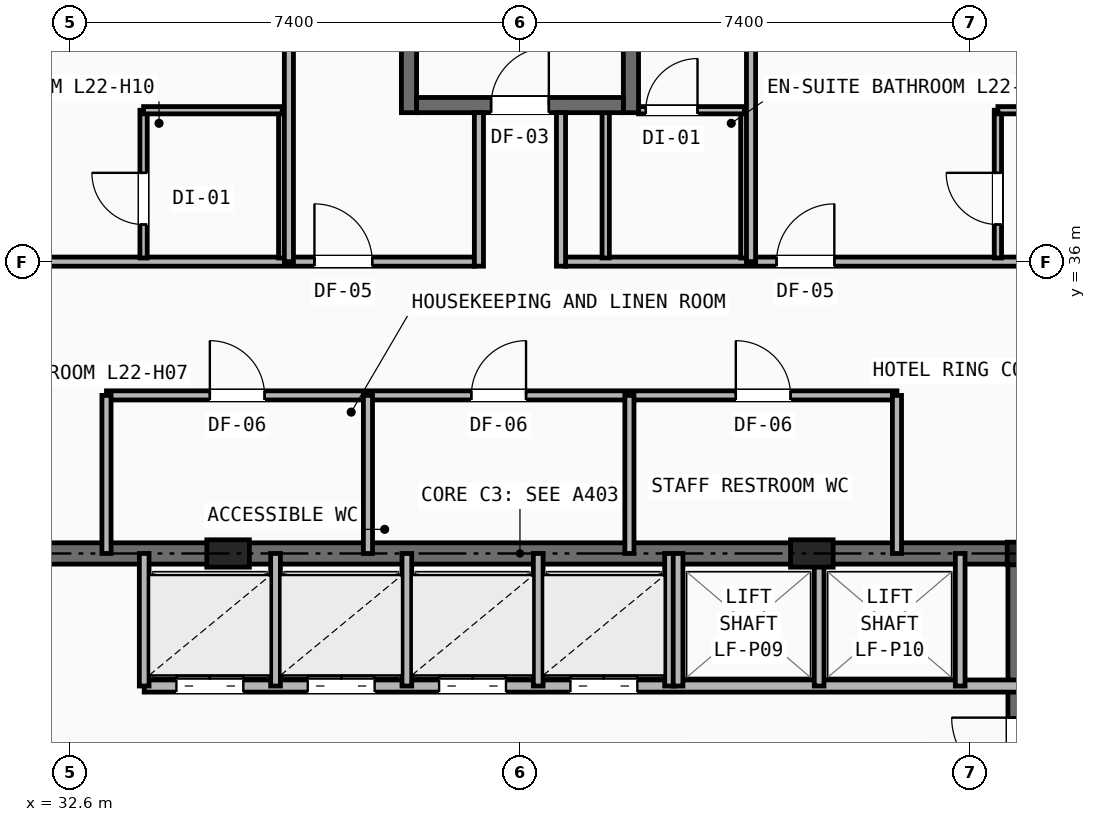
"""IFC4 building model, lengths in metres.
Left out: names, types, materials, properties, quantities, classifications, styles, units other than length and angle.
Written with IfcOpenShell. Run it as: python <this file> out.ifc"""

import sys

from ifc_helpers import new_model, si_unit, direction, frame, frame_2d, origin, origin_2d, place, context, subcontext, project, spatial, rectangle, i_section, extrude, element, fill, save


model = new_model("IFC4")
c1 = context("Model", 3, precision=1e-05, world=origin(), true_north=direction((0.0, 1.0)))
c2 = subcontext(c1, "Body", "Model", "MODEL_VIEW")
j1 = project(units=[si_unit("LENGTHUNIT", "METRE"), si_unit("PLANEANGLEUNIT", "RADIAN")], contexts=[c1])
p1 = place(None, origin())
s1 = spatial("IfcSite", under=j1, at=p1, CompositionType="ELEMENT")
p2 = place(p1, origin())
s2 = spatial("IfcBuilding", under=s1, at=p2, CompositionType="ELEMENT")
p3 = place(p2, frame((0.0, 0.0, 79.8)))
s3 = spatial("IfcBuildingStorey", under=s2, at=p3, CompositionType="ELEMENT", Elevation=79.8)
p4 = place(p3, frame((48.2, 31.2, 0.0), z_axis=(0.0, 0.0, 1.0), x_axis=(1.0, 0.0, 0.0)))
e1 = element("IfcColumn", 1, at=p4, inside=s3, PredefinedType="COLUMN", context=c2, shape_type="SweptSolid", body=[
    extrude(i_section(OverallWidth=0.374, OverallDepth=0.372, WebThickness=0.016, FlangeThickness=0.026, at=origin_2d()), origin(), (0.0, 0.0, 1.0), 3.2),
])
for number, where, z_axis, x_axis in (
    (2, (35.2, 31.2, 0.0), (0.0, 0.0, 1.0), (1.0, 0.0, 0.0)),
    (3, (44.8, 31.2, 0.0), (0.0, 0.0, 1.0), (1.0, 0.0, 0.0)),
):
    element("IfcColumn", number, at=place(p3, frame(where, z_axis=z_axis, x_axis=x_axis)), inside=s3, PredefinedType="PILASTER", context=c2, shape_type="SweptSolid", body=[
        extrude(rectangle(XDim=0.7, YDim=0.45, at=origin_2d()), origin(), (0.0, 0.0, 1.0), 3.2),
    ])
p5 = place(p3, frame((31.8, 31.2, 0.0), z_axis=(0.0, 0.0, 1.0), x_axis=(1.0, 0.0, 0.0)))
e4 = element("IfcWall", 4, at=p5, inside=s3, PredefinedType="SHEAR", context=c2, shape_type="SweptSolid", body=[
    extrude(rectangle(XDim=16.4, YDim=0.35, at=frame_2d((8.2, 0.0))), origin(), (0.0, 0.0, 1.0), 2.97),
])
p6 = place(p3, frame((48.2, 16.4, 0.0), z_axis=(0.0, 0.0, 1.0), x_axis=(0.0, 1.0, 0.0)))
e5 = element("IfcWall", 5, at=p6, inside=s3, PredefinedType="SHEAR", context=c2, shape_type="SweptSolid", body=[
    extrude(rectangle(XDim=14.8, YDim=0.35, at=frame_2d((7.4, 0.0))), origin(), (0.0, 0.0, 1.0), 2.97),
])
p7 = place(p6, frame((11.0, 0.0, 0.0)))
e6 = element("IfcOpeningElement", 6, at=p7, cuts=e5, PredefinedType="OPENING", context=c2, shape_type="SweptSolid", body=[
    extrude(rectangle(XDim=1.1, YDim=2.15, at=frame_2d((0.55, 1.075))), frame((0.0, 0.185, 0.0), z_axis=(0.0, -1.0, 0.0), x_axis=(1.0, 0.0, 0.0)), (0.0, 0.0, 1.0), 0.37),
])
p8 = place(p3, frame((33.82, 29.02, 0.0), z_axis=(0.0, 0.0, 1.0), x_axis=(1.0, 0.0, 0.0)))
e7 = element("IfcWall", 7, at=p8, inside=s3, PredefinedType="SOLIDWALL", context=c2, shape_type="SweptSolid", body=[
    extrude(rectangle(XDim=14.38, YDim=0.2, at=frame_2d((7.19, 0.0))), origin(), (0.0, 0.0, 1.0), 2.421),
])
p9 = place(p8, frame((0.53, 0.0, 0.0)))
e8 = element("IfcOpeningElement", 8, at=p9, cuts=e7, PredefinedType="OPENING", context=c2, shape_type="SweptSolid", body=[
    extrude(rectangle(XDim=1.1, YDim=2.15, at=frame_2d((0.55, 1.075))), frame((0.0, 0.11, 0.0), z_axis=(0.0, -1.0, 0.0), x_axis=(1.0, 0.0, 0.0)), (0.0, 0.0, 1.0), 0.22),
])
p10 = place(p8, frame((2.69, 0.0, 0.0)))
e9 = element("IfcOpeningElement", 9, at=p10, cuts=e7, PredefinedType="OPENING", context=c2, shape_type="SweptSolid", body=[
    extrude(rectangle(XDim=1.1, YDim=2.15, at=frame_2d((0.55, 1.075))), frame((0.0, 0.11, 0.0), z_axis=(0.0, -1.0, 0.0), x_axis=(1.0, 0.0, 0.0)), (0.0, 0.0, 1.0), 0.22),
])
p11 = place(p8, frame((4.85, 0.0, 0.0)))
e10 = element("IfcOpeningElement", 10, at=p11, cuts=e7, PredefinedType="OPENING", context=c2, shape_type="SweptSolid", body=[
    extrude(rectangle(XDim=1.1, YDim=2.15, at=frame_2d((0.55, 1.075))), frame((0.0, 0.11, 0.0), z_axis=(0.0, -1.0, 0.0), x_axis=(1.0, 0.0, 0.0)), (0.0, 0.0, 1.0), 0.22),
])
p12 = place(p8, frame((7.01, 0.0, 0.0)))
e11 = element("IfcOpeningElement", 11, at=p12, cuts=e7, PredefinedType="OPENING", context=c2, shape_type="SweptSolid", body=[
    extrude(rectangle(XDim=1.1, YDim=2.15, at=frame_2d((0.55, 1.075))), frame((0.0, 0.11, 0.0), z_axis=(0.0, -1.0, 0.0), x_axis=(1.0, 0.0, 0.0)), (0.0, 0.0, 1.0), 0.22),
])
for number, where, z_axis, x_axis in (
    (12, (33.82, 29.02, 0.0), (0.0, 0.0, 1.0), (0.0, 1.0, 0.0)),
    (13, (35.98, 29.02, 0.0), (0.0, 0.0, 1.0), (0.0, 1.0, 0.0)),
    (14, (38.14, 29.02, 0.0), (0.0, 0.0, 1.0), (0.0, 1.0, 0.0)),
    (15, (40.3, 29.02, 0.0), (0.0, 0.0, 1.0), (0.0, 1.0, 0.0)),
    (16, (42.46, 29.02, 0.0), (0.0, 0.0, 1.0), (0.0, 1.0, 0.0)),
    (17, (42.6, 29.02, 0.0), (0.0, 0.0, 1.0), (0.0, 1.0, 0.0)),
    (18, (44.92, 29.02, 0.0), (0.0, 0.0, 1.0), (0.0, 1.0, 0.0)),
    (19, (47.24, 29.02, 0.0), (0.0, 0.0, 1.0), (0.0, 1.0, 0.0)),
):
    element("IfcWall", number, at=place(p3, frame(where, z_axis=z_axis, x_axis=x_axis)), inside=s3, PredefinedType="SOLIDWALL", context=c2, shape_type="SweptSolid", body=[
        extrude(rectangle(XDim=2.18, YDim=0.16, at=frame_2d((1.09, 0.0))), origin(), (0.0, 0.0, 1.0), 2.421),
    ])
p13 = place(p3, frame((33.2, 33.8, 0.0), z_axis=(0.0, 0.0, 1.0), x_axis=(1.0, 0.0, 0.0)))
e20 = element("IfcWall", 20, at=p13, inside=s3, PredefinedType="PARTITIONING", context=c2, shape_type="SweptSolid", body=[
    extrude(rectangle(XDim=13.0, YDim=0.15, at=frame_2d((6.5, 0.0))), origin(), (0.0, 0.0, 1.0), 2.97),
])
p14 = place(p13, frame((1.7, 0.0, 0.0)))
e21 = element("IfcOpeningElement", 21, at=p14, cuts=e20, PredefinedType="OPENING", context=c2, shape_type="SweptSolid", body=[
    extrude(rectangle(XDim=0.9, YDim=2.1, at=frame_2d((0.45, 1.05))), frame((0.0, 0.085, 0.0), z_axis=(0.0, -1.0, 0.0), x_axis=(1.0, 0.0, 0.0)), (0.0, 0.0, 1.0), 0.17),
])
p15 = place(p13, frame((6.0, 0.0, 0.0)))
e22 = element("IfcOpeningElement", 22, at=p15, cuts=e20, PredefinedType="OPENING", context=c2, shape_type="SweptSolid", body=[
    extrude(rectangle(XDim=0.9, YDim=2.1, at=frame_2d((0.45, 1.05))), frame((0.0, 0.085, 0.0), z_axis=(0.0, -1.0, 0.0), x_axis=(1.0, 0.0, 0.0)), (0.0, 0.0, 1.0), 0.17),
])
p16 = place(p13, frame((10.35, 0.0, 0.0)))
e23 = element("IfcOpeningElement", 23, at=p16, cuts=e20, PredefinedType="OPENING", context=c2, shape_type="SweptSolid", body=[
    extrude(rectangle(XDim=0.9, YDim=2.1, at=frame_2d((0.45, 1.05))), frame((0.0, 0.085, 0.0), z_axis=(0.0, -1.0, 0.0), x_axis=(1.0, 0.0, 0.0)), (0.0, 0.0, 1.0), 0.17),
])
for number, where, z_axis, x_axis in (
    (24, (33.2, 31.2, 0.0), (0.0, 0.0, 1.0), (0.0, 1.0, 0.0)),
    (25, (46.2, 31.2, 0.0), (0.0, 0.0, 1.0), (0.0, 1.0, 0.0)),
    (26, (37.5, 31.2, 0.0), (0.0, 0.0, 1.0), (0.0, 1.0, 0.0)),
    (27, (41.8, 31.2, 0.0), (0.0, 0.0, 1.0), (0.0, 1.0, 0.0)),
):
    element("IfcWall", number, at=place(p3, frame(where, z_axis=z_axis, x_axis=x_axis)), inside=s3, PredefinedType="PARTITIONING", context=c2, shape_type="SweptSolid", body=[
        extrude(rectangle(XDim=2.6, YDim=0.15, at=frame_2d((1.3, 0.0))), origin(), (0.0, 0.0, 1.0), 2.421),
    ])
p17 = place(p3, frame((29.6, 36.0, 0.0), z_axis=(0.0, 0.0, 1.0), x_axis=(1.0, 0.0, 0.0)))
e28 = element("IfcWall", 28, at=p17, inside=s3, PredefinedType="PARTITIONING", context=c2, shape_type="SweptSolid", body=[
    extrude(rectangle(XDim=9.65, YDim=0.15, at=frame_2d((4.825, 0.0))), origin(), (0.0, 0.0, 1.0), 2.97),
])
p18 = place(p17, frame((0.57, 0.0, 0.0)))
e29 = element("IfcOpeningElement", 29, at=p18, cuts=e28, PredefinedType="OPENING", context=c2, shape_type="SweptSolid", body=[
    extrude(rectangle(XDim=0.95, YDim=2.1, at=frame_2d((0.475, 1.05))), frame((0.0, 0.085, 0.0), z_axis=(0.0, -1.0, 0.0), x_axis=(1.0, 0.0, 0.0)), (0.0, 0.0, 1.0), 0.17),
])
p19 = place(p17, frame((7.02, 0.0, 0.0)))
e30 = element("IfcOpeningElement", 30, at=p19, cuts=e28, PredefinedType="OPENING", context=c2, shape_type="SweptSolid", body=[
    extrude(rectangle(XDim=0.95, YDim=2.1, at=frame_2d((0.475, 1.05))), frame((0.0, 0.085, 0.0), z_axis=(0.0, -1.0, 0.0), x_axis=(1.0, 0.0, 0.0)), (0.0, 0.0, 1.0), 0.17),
])
p20 = place(p3, frame((40.75, 36.0, 0.0), z_axis=(0.0, 0.0, 1.0), x_axis=(1.0, 0.0, 0.0)))
e31 = element("IfcWall", 31, at=p20, inside=s3, PredefinedType="PARTITIONING", context=c2, shape_type="SweptSolid", body=[
    extrude(rectangle(XDim=9.65, YDim=0.15, at=frame_2d((4.825, 0.0))), origin(), (0.0, 0.0, 1.0), 2.503),
])
p21 = place(p20, frame((3.47, 0.0, 0.0)))
e32 = element("IfcOpeningElement", 32, at=p21, cuts=e31, PredefinedType="OPENING", context=c2, shape_type="SweptSolid", body=[
    extrude(rectangle(XDim=0.95, YDim=2.1, at=frame_2d((0.475, 1.05))), frame((0.0, 0.085, 0.0), z_axis=(0.0, -1.0, 0.0), x_axis=(1.0, 0.0, 0.0)), (0.0, 0.0, 1.0), 0.17),
])
p22 = place(p3, frame((33.81, 36.06, 0.0), z_axis=(0.0, 0.0, 1.0), x_axis=(0.0, 1.0, 0.0)))
e33 = element("IfcWall", 33, at=p22, inside=s3, PredefinedType="PARTITIONING", context=c2, shape_type="SweptSolid", body=[
    extrude(rectangle(XDim=2.43, YDim=0.12, at=frame_2d((1.215, 0.0))), origin(), (0.0, 0.0, 1.0), 2.97),
])
p23 = place(p22, frame((0.55, 0.0, 0.0)))
e34 = element("IfcOpeningElement", 34, at=p23, cuts=e33, PredefinedType="OPENING", context=c2, shape_type="SweptSolid", body=[
    extrude(rectangle(XDim=0.85, YDim=2.05, at=frame_2d((0.425, 1.025))), frame((0.0, 0.07, 0.0), z_axis=(0.0, -1.0, 0.0), x_axis=(1.0, 0.0, 0.0)), (0.0, 0.0, 1.0), 0.14),
])
p24 = place(p3, frame((36.09, 36.06, 0.0), z_axis=(0.0, 0.0, 1.0), x_axis=(0.0, 1.0, 0.0)))
e35 = element("IfcWall", 35, at=p24, inside=s3, PredefinedType="PARTITIONING", context=c2, shape_type="SweptSolid", body=[
    extrude(rectangle(XDim=2.43, YDim=0.12, at=frame_2d((1.215, 0.0))), origin(), (0.0, 0.0, 1.0), 2.97),
])
p25 = place(p3, frame((33.81, 38.49, 0.0), z_axis=(0.0, 0.0, 1.0), x_axis=(1.0, 0.0, 0.0)))
e36 = element("IfcWall", 36, at=p25, inside=s3, PredefinedType="PARTITIONING", context=c2, shape_type="SweptSolid", body=[
    extrude(rectangle(XDim=2.28, YDim=0.12, at=frame_2d((1.14, 0.0))), origin(), (0.0, 0.0, 1.0), 2.97),
])
p26 = place(p3, frame((36.2, 36.0, 0.0), z_axis=(0.0, 0.0, 1.0), x_axis=(0.0, 1.0, 0.0)))
e37 = element("IfcWall", 37, at=p26, inside=s3, PredefinedType="PARTITIONING", context=c2, shape_type="SweptSolid", body=[
    extrude(rectangle(XDim=17.797, YDim=0.15, at=frame_2d((8.899, 0.0))), origin(), (0.0, 0.0, 1.0), 2.181),
])
p27 = place(p3, frame((41.41, 36.06, 0.0), z_axis=(0.0, 0.0, 1.0), x_axis=(0.0, 1.0, 0.0)))
e38 = element("IfcWall", 38, at=p27, inside=s3, PredefinedType="PARTITIONING", context=c2, shape_type="SweptSolid", body=[
    extrude(rectangle(XDim=2.39, YDim=0.12, at=frame_2d((1.195, 0.0))), origin(), (0.0, 0.0, 1.0), 2.97),
])
p28 = place(p3, frame((43.69, 36.06, 0.0), z_axis=(0.0, 0.0, 1.0), x_axis=(0.0, 1.0, 0.0)))
e39 = element("IfcWall", 39, at=p28, inside=s3, PredefinedType="PARTITIONING", context=c2, shape_type="SweptSolid", body=[
    extrude(rectangle(XDim=2.43, YDim=0.12, at=frame_2d((1.215, 0.0))), origin(), (0.0, 0.0, 1.0), 2.97),
])
p29 = place(p3, frame((41.95, 38.49, 0.0), z_axis=(0.0, 0.0, 1.0), x_axis=(1.0, 0.0, 0.0)))
e40 = element("IfcWall", 40, at=p29, inside=s3, PredefinedType="PARTITIONING", context=c2, shape_type="SweptSolid", body=[
    extrude(rectangle(XDim=1.74, YDim=0.12, at=frame_2d((0.87, 0.0))), origin(), (0.0, 0.0, 1.0), 2.97),
])
p30 = place(p29, frame((0.12, 0.0, 0.0)))
e41 = element("IfcOpeningElement", 41, at=p30, cuts=e40, PredefinedType="OPENING", context=c2, shape_type="SweptSolid", body=[
    extrude(rectangle(XDim=0.85, YDim=2.05, at=frame_2d((0.425, 1.025))), frame((0.0, 0.07, 0.0), z_axis=(0.0, -1.0, 0.0), x_axis=(1.0, 0.0, 0.0)), (0.0, 0.0, 1.0), 0.14),
])
p31 = place(p3, frame((43.8, 36.0, 0.0), z_axis=(0.0, 0.0, 1.0), x_axis=(0.0, 1.0, 0.0)))
e42 = element("IfcWall", 42, at=p31, inside=s3, PredefinedType="PARTITIONING", context=c2, shape_type="SweptSolid", body=[
    extrude(rectangle(XDim=17.797, YDim=0.15, at=frame_2d((8.899, 0.0))), origin(), (0.0, 0.0, 1.0), 2.181),
])
p32 = place(p3, frame((47.86, 36.06, 0.0), z_axis=(0.0, 0.0, 1.0), x_axis=(0.0, 1.0, 0.0)))
e43 = element("IfcWall", 43, at=p32, inside=s3, PredefinedType="PARTITIONING", context=c2, shape_type="SweptSolid", body=[
    extrude(rectangle(XDim=2.43, YDim=0.12, at=frame_2d((1.215, 0.0))), origin(), (0.0, 0.0, 1.0), 2.503),
])
p33 = place(p32, frame((0.55, 0.0, 0.0)))
e44 = element("IfcOpeningElement", 44, at=p33, cuts=e43, PredefinedType="OPENING", context=c2, shape_type="SweptSolid", body=[
    extrude(rectangle(XDim=0.85, YDim=2.05, at=frame_2d((0.425, 1.025))), frame((0.0, 0.07, 0.0), z_axis=(0.0, -1.0, 0.0), x_axis=(1.0, 0.0, 0.0)), (0.0, 0.0, 1.0), 0.14),
])
p34 = place(p3, frame((47.86, 38.49, 0.0), z_axis=(0.0, 0.0, 1.0), x_axis=(1.0, 0.0, 0.0)))
e45 = element("IfcWall", 45, at=p34, inside=s3, PredefinedType="PARTITIONING", context=c2, shape_type="SweptSolid", body=[
    extrude(rectangle(XDim=2.28, YDim=0.12, at=frame_2d((1.14, 0.0))), origin(), (0.0, 0.0, 1.0), 2.503),
])
for number, where, z_axis, x_axis in (
    (46, (38.175, 38.45, 0.0), (0.0, 0.0, 1.0), (0.0, 1.0, 0.0)),
    (47, (41.825, 38.45, 0.0), (0.0, 0.0, 1.0), (0.0, 1.0, 0.0)),
):
    element("IfcWall", number, at=place(p3, frame(where, z_axis=z_axis, x_axis=x_axis)), inside=s3, PredefinedType="SHEAR", context=c2, shape_type="SweptSolid", body=[
        extrude(rectangle(XDim=8.55, YDim=0.25, at=frame_2d((4.275, 0.0))), origin(), (0.0, 0.0, 1.0), 2.97),
    ])
p35 = place(p3, frame((38.3, 38.575, 0.0), z_axis=(0.0, 0.0, 1.0), x_axis=(1.0, 0.0, 0.0)))
e48 = element("IfcWall", 48, at=p35, inside=s3, PredefinedType="SHEAR", context=c2, shape_type="SweptSolid", body=[
    extrude(rectangle(XDim=3.4, YDim=0.25, at=frame_2d((1.7, 0.0))), origin(), (0.0, 0.0, 1.0), 2.97),
])
p36 = place(p35, frame((1.225, 0.0, 0.0)))
e49 = element("IfcOpeningElement", 49, at=p36, cuts=e48, PredefinedType="OPENING", context=c2, shape_type="SweptSolid", body=[
    extrude(rectangle(XDim=0.95, YDim=2.1, at=frame_2d((0.475, 1.05))), frame((0.0, 0.135, 0.0), z_axis=(0.0, -1.0, 0.0), x_axis=(1.0, 0.0, 0.0)), (0.0, 0.0, 1.0), 0.27),
])
for number, where, z_axis, x_axis in (
    (50, (39.325, 35.925, 0.0), (0.0, 0.0, 1.0), (0.0, 1.0, 0.0)),
    (51, (40.675, 35.925, 0.0), (0.0, 0.0, 1.0), (0.0, 1.0, 0.0)),
):
    element("IfcWall", number, at=place(p3, frame(where, z_axis=z_axis, x_axis=x_axis)), inside=s3, PredefinedType="PARTITIONING", context=c2, shape_type="SweptSolid", body=[
        extrude(rectangle(XDim=2.525, YDim=0.15, at=frame_2d((1.262, 0.0))), origin(), (0.0, 0.0, 1.0), 2.97),
    ])
p37 = place(p9, origin())
e52 = element("IfcDoor", 52, at=p37, inside=s3, OperationType="DOUBLE_DOOR_SLIDING", PredefinedType="DOOR", context=c2, shape_type="SweptSolid", body=[
    extrude(rectangle(XDim=1.1, YDim=2.15, at=frame_2d((0.55, 1.075))), frame((0.0, 0.025, 0.0), z_axis=(0.0, -1.0, 0.0), x_axis=(1.0, 0.0, 0.0)), (0.0, 0.0, 1.0), 0.05),
])
fill(e8, e52)
p38 = place(p10, origin())
e53 = element("IfcDoor", 53, at=p38, inside=s3, OperationType="DOUBLE_DOOR_SLIDING", PredefinedType="DOOR", context=c2, shape_type="SweptSolid", body=[
    extrude(rectangle(XDim=1.1, YDim=2.15, at=frame_2d((0.55, 1.075))), frame((0.0, 0.025, 0.0), z_axis=(0.0, -1.0, 0.0), x_axis=(1.0, 0.0, 0.0)), (0.0, 0.0, 1.0), 0.05),
])
fill(e9, e53)
p39 = place(p11, origin())
e54 = element("IfcDoor", 54, at=p39, inside=s3, OperationType="DOUBLE_DOOR_SLIDING", PredefinedType="DOOR", context=c2, shape_type="SweptSolid", body=[
    extrude(rectangle(XDim=1.1, YDim=2.15, at=frame_2d((0.55, 1.075))), frame((0.0, 0.025, 0.0), z_axis=(0.0, -1.0, 0.0), x_axis=(1.0, 0.0, 0.0)), (0.0, 0.0, 1.0), 0.05),
])
fill(e10, e54)
p40 = place(p12, origin())
e55 = element("IfcDoor", 55, at=p40, inside=s3, OperationType="DOUBLE_DOOR_SLIDING", PredefinedType="DOOR", context=c2, shape_type="SweptSolid", body=[
    extrude(rectangle(XDim=1.1, YDim=2.15, at=frame_2d((0.55, 1.075))), frame((0.0, 0.025, 0.0), z_axis=(0.0, -1.0, 0.0), x_axis=(1.0, 0.0, 0.0)), (0.0, 0.0, 1.0), 0.05),
])
fill(e11, e55)
p41 = place(p14, origin())
e56 = element("IfcDoor", 56, at=p41, inside=s3, OperationType="SINGLE_SWING_LEFT", PredefinedType="DOOR", context=c2, shape_type="SweptSolid", body=[
    extrude(rectangle(XDim=0.9, YDim=2.1, at=frame_2d((0.45, 1.05))), frame((0.0, 0.025, 0.0), z_axis=(0.0, -1.0, 0.0), x_axis=(1.0, 0.0, 0.0)), (0.0, 0.0, 1.0), 0.05),
])
fill(e21, e56)
p42 = place(p15, origin())
e57 = element("IfcDoor", 57, at=p42, inside=s3, OperationType="SINGLE_SWING_RIGHT", PredefinedType="DOOR", context=c2, shape_type="SweptSolid", body=[
    extrude(rectangle(XDim=0.9, YDim=2.1, at=frame_2d((0.45, 1.05))), frame((0.0, 0.025, 0.0), z_axis=(0.0, -1.0, 0.0), x_axis=(1.0, 0.0, 0.0)), (0.0, 0.0, 1.0), 0.05),
])
fill(e22, e57)
p43 = place(p16, origin())
e58 = element("IfcDoor", 58, at=p43, inside=s3, OperationType="SINGLE_SWING_LEFT", PredefinedType="DOOR", context=c2, shape_type="SweptSolid", body=[
    extrude(rectangle(XDim=0.9, YDim=2.1, at=frame_2d((0.45, 1.05))), frame((0.0, 0.025, 0.0), z_axis=(0.0, -1.0, 0.0), x_axis=(1.0, 0.0, 0.0)), (0.0, 0.0, 1.0), 0.05),
])
fill(e23, e58)
p44 = place(p23, origin())
e59 = element("IfcDoor", 59, at=p44, inside=s3, OperationType="SINGLE_SWING_RIGHT", PredefinedType="DOOR", context=c2, shape_type="SweptSolid", body=[
    extrude(rectangle(XDim=0.85, YDim=2.05, at=frame_2d((0.425, 1.025))), frame((0.0, 0.025, 0.0), z_axis=(0.0, -1.0, 0.0), x_axis=(1.0, 0.0, 0.0)), (0.0, 0.0, 1.0), 0.05),
])
fill(e34, e59)
p45 = place(p19, origin())
e60 = element("IfcDoor", 60, at=p45, inside=s3, OperationType="SINGLE_SWING_LEFT", PredefinedType="DOOR", context=c2, shape_type="SweptSolid", body=[
    extrude(rectangle(XDim=0.95, YDim=2.1, at=frame_2d((0.475, 1.05))), frame((0.0, 0.025, 0.0), z_axis=(0.0, -1.0, 0.0), x_axis=(1.0, 0.0, 0.0)), (0.0, 0.0, 1.0), 0.05),
])
fill(e30, e60)
p46 = place(p30, origin())
e61 = element("IfcDoor", 61, at=p46, inside=s3, OperationType="SINGLE_SWING_RIGHT", PredefinedType="DOOR", context=c2, shape_type="SweptSolid", body=[
    extrude(rectangle(XDim=0.85, YDim=2.05, at=frame_2d((0.425, 1.025))), frame((0.0, 0.025, 0.0), z_axis=(0.0, -1.0, 0.0), x_axis=(1.0, 0.0, 0.0)), (0.0, 0.0, 1.0), 0.05),
])
fill(e41, e61)
p47 = place(p21, origin())
e62 = element("IfcDoor", 62, at=p47, inside=s3, OperationType="SINGLE_SWING_RIGHT", PredefinedType="DOOR", context=c2, shape_type="SweptSolid", body=[
    extrude(rectangle(XDim=0.95, YDim=2.1, at=frame_2d((0.475, 1.05))), frame((0.0, 0.025, 0.0), z_axis=(0.0, -1.0, 0.0), x_axis=(1.0, 0.0, 0.0)), (0.0, 0.0, 1.0), 0.05),
])
fill(e32, e62)
p48 = place(p33, origin())
e63 = element("IfcDoor", 63, at=p48, inside=s3, OperationType="SINGLE_SWING_RIGHT", PredefinedType="DOOR", context=c2, shape_type="SweptSolid", body=[
    extrude(rectangle(XDim=0.85, YDim=2.05, at=frame_2d((0.425, 1.025))), frame((0.0, 0.025, 0.0), z_axis=(0.0, -1.0, 0.0), x_axis=(1.0, 0.0, 0.0)), (0.0, 0.0, 1.0), 0.05),
])
fill(e44, e63)
p49 = place(p36, origin())
e64 = element("IfcDoor", 64, at=p49, inside=s3, OperationType="SINGLE_SWING_RIGHT", PredefinedType="DOOR", context=c2, shape_type="SweptSolid", body=[
    extrude(rectangle(XDim=0.95, YDim=2.1, at=frame_2d((0.475, 1.05))), frame((0.0, 0.025, 0.0), z_axis=(0.0, -1.0, 0.0), x_axis=(1.0, 0.0, 0.0)), (0.0, 0.0, 1.0), 0.05),
])
fill(e49, e64)
save(model, sys.argv[1])
